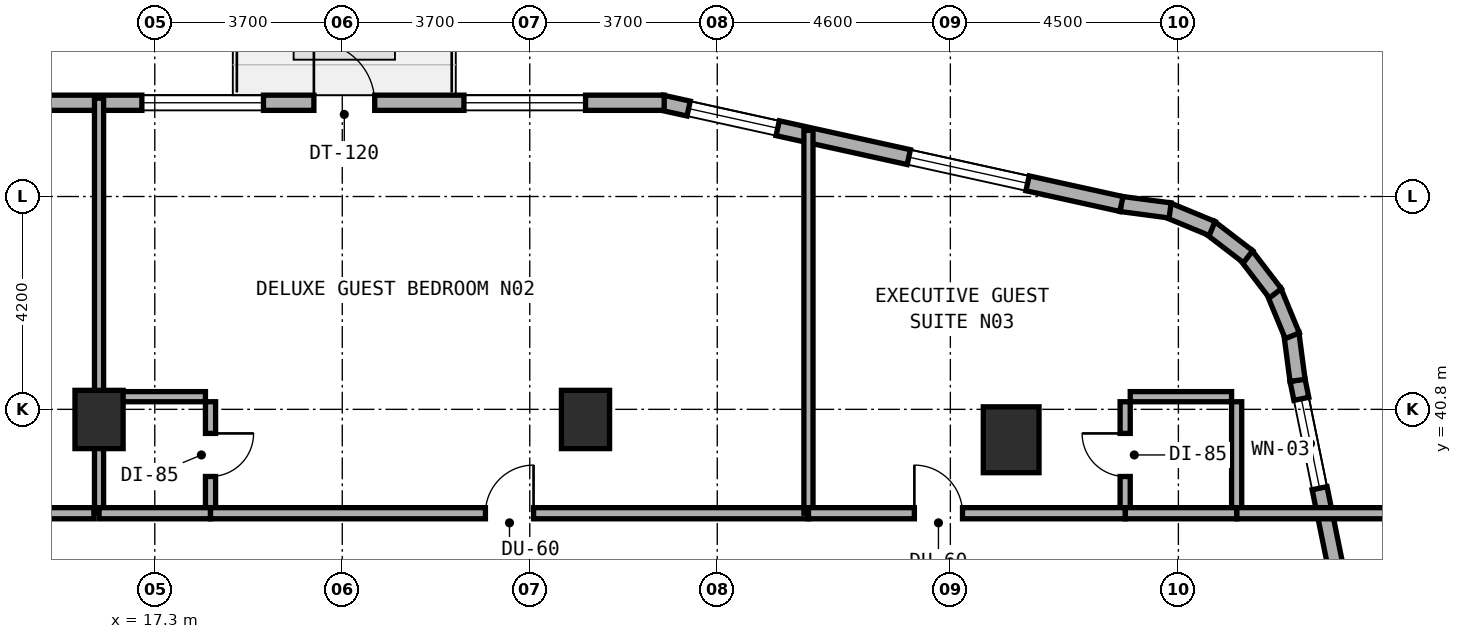
"""IFC4 building model, lengths in metres.
Left out: names, types, materials, properties, quantities, classifications, styles, units other than length and angle.
Written with IfcOpenShell. Run it as: python <this file> out.ifc"""

import sys

from ifc_helpers import new_model, si_unit, direction, frame, frame_2d, origin, origin_2d, place, context, subcontext, project, spatial, rectangle, extrude, element, fill, save


model = new_model("IFC4")
c1 = context("Model", 3, precision=1e-05, world=origin(), true_north=direction((0.0, 1.0)))
c2 = subcontext(c1, "Body", "Model", "MODEL_VIEW")
j1 = project(units=[si_unit("LENGTHUNIT", "METRE"), si_unit("PLANEANGLEUNIT", "RADIAN")], contexts=[c1])
p1 = place(None, origin())
s1 = spatial("IfcSite", under=j1, at=p1, CompositionType="ELEMENT")
p2 = place(p1, origin())
s2 = spatial("IfcBuilding", under=s1, at=p2, CompositionType="ELEMENT")
p3 = place(p2, frame((0.0, 0.0, 48.5)))
s3 = spatial("IfcBuildingStorey", under=s2, at=p3, CompositionType="ELEMENT", Elevation=48.5)
for number, where, z_axis, x_axis in (
    (1, (16.2, 40.6, 0.0), (0.0, 0.0, 1.0), (1.0, 0.0, 0.0)),
    (2, (25.8, 40.6, 0.0), (0.0, 0.0, 1.0), (1.0, 0.0, 0.0)),
):
    element("IfcColumn", number, at=place(p3, frame(where, z_axis=z_axis, x_axis=x_axis)), inside=s3, PredefinedType="COLUMN", context=c2, shape_type="SweptSolid", body=[
        extrude(rectangle(XDim=0.95, YDim=1.15, at=origin_2d()), origin(), (0.0, 0.0, 1.0), 3.5),
    ])
p4 = place(p3, frame((34.2, 40.2, 0.0), z_axis=(0.0, 0.0, 1.0), x_axis=(1.0, 0.0, 0.0)))
e3 = element("IfcColumn", 3, at=p4, inside=s3, PredefinedType="COLUMN", context=c2, shape_type="SweptSolid", body=[
    extrude(rectangle(XDim=1.1, YDim=1.3, at=origin_2d()), origin(), (0.0, 0.0, 1.0), 3.5),
])
p5 = place(p3, frame((41.864, 31.516, 0.0), z_axis=(0.0, 0.0, 1.0), x_axis=(-0.199990901713, 0.979797754249, 0.0)))
e4 = element("IfcWall", 4, at=p5, inside=s3, PredefinedType="STANDARD", context=c2, shape_type="SweptSolid", body=[
    extrude(rectangle(XDim=10.065, YDim=0.3, at=frame_2d((5.033, 0.0))), origin(), (0.0, 0.0, 1.0), 3.22),
])
p6 = place(p5, frame((2.429, 0.0, 0.8)))
e5 = element("IfcOpeningElement", 5, at=p6, cuts=e4, PredefinedType="OPENING", context=c2, shape_type="SweptSolid", body=[
    extrude(rectangle(XDim=2.4, YDim=1.6, at=frame_2d((1.2, 0.8))), frame((0.0, 0.16, 0.0), z_axis=(0.0, -1.0, 0.0), x_axis=(1.0, 0.0, 0.0)), (0.0, 0.0, 1.0), 0.32),
])
p7 = place(p5, frame((7.887, 0.0, 0.85)))
e6 = element("IfcOpeningElement", 6, at=p7, cuts=e4, PredefinedType="OPENING", context=c2, shape_type="SweptSolid", body=[
    extrude(rectangle(XDim=1.8, YDim=1.5, at=frame_2d((0.9, 0.75))), frame((0.0, 0.16, 0.0), z_axis=(0.0, -1.0, 0.0), x_axis=(1.0, 0.0, 0.0)), (0.0, 0.0, 1.0), 0.32),
])
p8 = place(p3, frame((39.852, 41.372, 0.0), z_axis=(0.0, 0.0, 1.0), x_axis=(-0.131174864804, 0.991359246108, 0.0)))
e7 = element("IfcWall", 7, at=p8, inside=s3, PredefinedType="STANDARD", context=c2, shape_type="SweptSolid", body=[
    extrude(rectangle(XDim=0.938, YDim=0.3, at=frame_2d((0.469, 0.0))), origin(), (0.0, 0.0, 1.0), 3.22),
])
p9 = place(p3, frame((39.748, 42.252, 0.0), z_axis=(0.0, 0.0, 1.0), x_axis=(-0.382344263057, 0.924019948111, 0.0)))
e8 = element("IfcWall", 8, at=p9, inside=s3, PredefinedType="STANDARD", context=c2, shape_type="SweptSolid", body=[
    extrude(rectangle(XDim=0.955, YDim=0.3, at=frame_2d((0.477, 0.0))), origin(), (0.0, 0.0, 1.0), 3.22),
])
p10 = place(p3, frame((39.414, 43.089, 0.0), z_axis=(0.0, 0.0, 1.0), x_axis=(-0.608474481025, 0.793573440799, 0.0)))
e9 = element("IfcWall", 9, at=p10, inside=s3, PredefinedType="STANDARD", context=c2, shape_type="SweptSolid", body=[
    extrude(rectangle(XDim=0.955, YDim=0.3, at=frame_2d((0.478, 0.0))), origin(), (0.0, 0.0, 1.0), 3.22),
])
p11 = place(p3, frame((38.875, 43.812, 0.0), z_axis=(0.0, 0.0, 1.0), x_axis=(-0.793668068435, 0.608351047625, 0.0)))
e10 = element("IfcWall", 10, at=p11, inside=s3, PredefinedType="STANDARD", context=c2, shape_type="SweptSolid", body=[
    extrude(rectangle(XDim=0.955, YDim=0.3, at=frame_2d((0.478, 0.0))), origin(), (0.0, 0.0, 1.0), 3.22),
])
p12 = place(p3, frame((38.166, 44.369, 0.0), z_axis=(0.0, 0.0, 1.0), x_axis=(-0.924019948111, 0.382344263057, 0.0)))
e11 = element("IfcWall", 11, at=p12, inside=s3, PredefinedType="STANDARD", context=c2, shape_type="SweptSolid", body=[
    extrude(rectangle(XDim=0.955, YDim=0.3, at=frame_2d((0.477, 0.0))), origin(), (0.0, 0.0, 1.0), 3.22),
])
p13 = place(p3, frame((37.337, 44.725, 0.0), z_axis=(0.0, 0.0, 1.0), x_axis=(-0.991454295543, 0.130454512571, 0.0)))
e12 = element("IfcWall", 12, at=p13, inside=s3, PredefinedType="STANDARD", context=c2, shape_type="SweptSolid", body=[
    extrude(rectangle(XDim=0.973, YDim=0.3, at=frame_2d((0.487, 0.0))), origin(), (0.0, 0.0, 1.0), 3.22),
])
p14 = place(p3, frame((36.376, 44.852, 0.0), z_axis=(0.0, 0.0, 1.0), x_axis=(-0.976540764801, 0.215332614068, 0.0)))
e13 = element("IfcWall", 13, at=p14, inside=s3, PredefinedType="STANDARD", context=c2, shape_type="SweptSolid", body=[
    extrude(rectangle(XDim=9.288, YDim=0.3, at=frame_2d((4.644, 0.0))), origin(), (0.0, 0.0, 1.0), 3.22),
])
p15 = place(p14, frame((1.897, 0.0, 0.8)))
e14 = element("IfcOpeningElement", 14, at=p15, cuts=e13, PredefinedType="OPENING", context=c2, shape_type="SweptSolid", body=[
    extrude(rectangle(XDim=2.4, YDim=1.6, at=frame_2d((1.2, 0.8))), frame((0.0, 0.16, 0.0), z_axis=(0.0, -1.0, 0.0), x_axis=(1.0, 0.0, 0.0)), (0.0, 0.0, 1.0), 0.32),
])
p16 = place(p14, frame((6.946, 0.0, 0.85)))
e15 = element("IfcOpeningElement", 15, at=p16, cuts=e13, PredefinedType="OPENING", context=c2, shape_type="SweptSolid", body=[
    extrude(rectangle(XDim=1.8, YDim=1.5, at=frame_2d((0.9, 0.75))), frame((0.0, 0.16, 0.0), z_axis=(0.0, -1.0, 0.0), x_axis=(1.0, 0.0, 0.0)), (0.0, 0.0, 1.0), 0.32),
])
p17 = place(p3, frame((27.353, 46.85, 0.0), z_axis=(0.0, 0.0, 1.0), x_axis=(-1.0, 0.0, 0.0)))
e16 = element("IfcWall", 16, at=p17, inside=s3, PredefinedType="STANDARD", context=c2, shape_type="SweptSolid", body=[
    extrude(rectangle(XDim=12.591, YDim=0.3, at=frame_2d((6.295, 0.0))), origin(), (0.0, 0.0, 1.0), 3.22),
])
p18 = place(p17, frame((5.713, 0.0, 0.0)))
e17 = element("IfcOpeningElement", 17, at=p18, cuts=e16, PredefinedType="OPENING", context=c2, shape_type="SweptSolid", body=[
    extrude(rectangle(XDim=1.2, YDim=2.15, at=frame_2d((0.6, 1.075))), frame((0.0, 0.16, 0.0), z_axis=(0.0, -1.0, 0.0), x_axis=(1.0, 0.0, 0.0)), (0.0, 0.0, 1.0), 0.32),
])
p19 = place(p17, frame((1.552, 0.0, 0.8)))
e18 = element("IfcOpeningElement", 18, at=p19, cuts=e16, PredefinedType="OPENING", context=c2, shape_type="SweptSolid", body=[
    extrude(rectangle(XDim=2.4, YDim=1.6, at=frame_2d((1.2, 0.8))), frame((0.0, 0.16, 0.0), z_axis=(0.0, -1.0, 0.0), x_axis=(1.0, 0.0, 0.0)), (0.0, 0.0, 1.0), 0.32),
])
p20 = place(p17, frame((7.908, 0.0, 0.8)))
e19 = element("IfcOpeningElement", 19, at=p20, cuts=e16, PredefinedType="OPENING", context=c2, shape_type="SweptSolid", body=[
    extrude(rectangle(XDim=2.4, YDim=1.6, at=frame_2d((1.2, 0.8))), frame((0.0, 0.16, 0.0), z_axis=(0.0, -1.0, 0.0), x_axis=(1.0, 0.0, 0.0)), (0.0, 0.0, 1.0), 0.32),
])
p21 = place(p3, frame((7.9, 38.75, 0.0), z_axis=(0.0, 0.0, 1.0), x_axis=(1.0, 0.0, 0.0)))
e20 = element("IfcWall", 20, at=p21, inside=s3, PredefinedType="SOLIDWALL", context=c2, shape_type="SweptSolid", body=[
    extrude(rectangle(XDim=8.2, YDim=0.22, at=frame_2d((4.1, 0.0))), origin(), (0.0, 0.0, 1.0), 2.955),
])
p22 = place(p21, frame((3.252, 0.0, 0.0)))
e21 = element("IfcOpeningElement", 21, at=p22, cuts=e20, PredefinedType="OPENING", context=c2, shape_type="SweptSolid", body=[
    extrude(rectangle(XDim=0.95, YDim=2.1, at=frame_2d((0.475, 1.05))), frame((0.0, 0.12, 0.0), z_axis=(0.0, -1.0, 0.0), x_axis=(1.0, 0.0, 0.0)), (0.0, 0.0, 1.0), 0.24),
])
p23 = place(p3, frame((16.2, 38.75, 0.0), z_axis=(0.0, 0.0, 1.0), x_axis=(0.0, 1.0, 0.0)))
e22 = element("IfcWall", 22, at=p23, inside=s3, PredefinedType="SOLIDWALL", context=c2, shape_type="SweptSolid", body=[
    extrude(rectangle(XDim=8.19, YDim=0.18, at=frame_2d((4.095, 0.0))), origin(), (0.0, 0.0, 1.0), 2.395),
])
p24 = place(p3, frame((18.4, 38.85, 0.0), z_axis=(0.0, 0.0, 1.0), x_axis=(0.0, 1.0, 0.0)))
e23 = element("IfcWall", 23, at=p24, inside=s3, PredefinedType="PLUMBINGWALL", context=c2, shape_type="SweptSolid", body=[
    extrude(rectangle(XDim=2.1, YDim=0.2, at=frame_2d((1.05, 0.0))), origin(), (0.0, 0.0, 1.0), 2.745),
])
p25 = place(p24, frame((0.625, 0.0, 0.0)))
e24 = element("IfcOpeningElement", 24, at=p25, cuts=e23, PredefinedType="OPENING", context=c2, shape_type="SweptSolid", body=[
    extrude(rectangle(XDim=0.85, YDim=2.1, at=frame_2d((0.425, 1.05))), frame((0.0, 0.11, 0.0), z_axis=(0.0, -1.0, 0.0), x_axis=(1.0, 0.0, 0.0)), (0.0, 0.0, 1.0), 0.22),
])
p26 = place(p3, frame((16.3, 41.05, 0.0), z_axis=(0.0, 0.0, 1.0), x_axis=(1.0, 0.0, 0.0)))
e25 = element("IfcWall", 25, at=p26, inside=s3, PredefinedType="PLUMBINGWALL", context=c2, shape_type="SweptSolid", body=[
    extrude(rectangle(XDim=2.0, YDim=0.2, at=frame_2d((1.0, 0.0))), origin(), (0.0, 0.0, 1.0), 3.22),
])
p27 = place(p3, frame((16.2, 38.75, 0.0), z_axis=(0.0, 0.0, 1.0), x_axis=(1.0, 0.0, 0.0)))
e26 = element("IfcWall", 26, at=p27, inside=s3, PredefinedType="SOLIDWALL", context=c2, shape_type="SweptSolid", body=[
    extrude(rectangle(XDim=2.2, YDim=0.22, at=frame_2d((1.1, 0.0))), origin(), (0.0, 0.0, 1.0), 2.395),
])
p28 = place(p3, frame((18.4, 38.75, 0.0), z_axis=(0.0, 0.0, 1.0), x_axis=(1.0, 0.0, 0.0)))
e27 = element("IfcWall", 27, at=p28, inside=s3, PredefinedType="SOLIDWALL", context=c2, shape_type="SweptSolid", body=[
    extrude(rectangle(XDim=11.8, YDim=0.22, at=frame_2d((5.9, 0.0))), origin(), (0.0, 0.0, 1.0), 2.395),
])
p29 = place(p28, frame((5.425, 0.0, 0.0)))
e28 = element("IfcOpeningElement", 28, at=p29, cuts=e27, PredefinedType="OPENING", context=c2, shape_type="SweptSolid", body=[
    extrude(rectangle(XDim=0.95, YDim=2.1, at=frame_2d((0.475, 1.05))), frame((0.0, 0.12, 0.0), z_axis=(0.0, -1.0, 0.0), x_axis=(1.0, 0.0, 0.0)), (0.0, 0.0, 1.0), 0.24),
])
p30 = place(p3, frame((30.2, 38.75, 0.0), z_axis=(0.0, 0.0, 1.0), x_axis=(0.0, 1.0, 0.0)))
e29 = element("IfcWall", 29, at=p30, inside=s3, PredefinedType="SOLIDWALL", context=c2, shape_type="SweptSolid", body=[
    extrude(rectangle(XDim=7.555, YDim=0.18, at=frame_2d((3.777, 0.0))), origin(), (0.0, 0.0, 1.0), 2.745),
])
p31 = place(p3, frame((36.45, 38.85, 0.0), z_axis=(0.0, 0.0, 1.0), x_axis=(0.0, 1.0, 0.0)))
e30 = element("IfcWall", 30, at=p31, inside=s3, PredefinedType="PLUMBINGWALL", context=c2, shape_type="SweptSolid", body=[
    extrude(rectangle(XDim=2.1, YDim=0.2, at=frame_2d((1.05, 0.0))), origin(), (0.0, 0.0, 1.0), 3.22),
])
p32 = place(p31, frame((0.625, 0.0, 0.0)))
e31 = element("IfcOpeningElement", 31, at=p32, cuts=e30, PredefinedType="OPENING", context=c2, shape_type="SweptSolid", body=[
    extrude(rectangle(XDim=0.85, YDim=2.1, at=frame_2d((0.425, 1.05))), frame((0.0, 0.11, 0.0), z_axis=(0.0, -1.0, 0.0), x_axis=(1.0, 0.0, 0.0)), (0.0, 0.0, 1.0), 0.22),
])
p33 = place(p3, frame((36.55, 41.05, 0.0), z_axis=(0.0, 0.0, 1.0), x_axis=(1.0, 0.0, 0.0)))
e32 = element("IfcWall", 32, at=p33, inside=s3, PredefinedType="PLUMBINGWALL", context=c2, shape_type="SweptSolid", body=[
    extrude(rectangle(XDim=2.0, YDim=0.2, at=frame_2d((1.0, 0.0))), origin(), (0.0, 0.0, 1.0), 3.22),
])
p34 = place(p3, frame((38.65, 38.85, 0.0), z_axis=(0.0, 0.0, 1.0), x_axis=(0.0, 1.0, 0.0)))
e33 = element("IfcWall", 33, at=p34, inside=s3, PredefinedType="PLUMBINGWALL", context=c2, shape_type="SweptSolid", body=[
    extrude(rectangle(XDim=2.1, YDim=0.2, at=frame_2d((1.05, 0.0))), origin(), (0.0, 0.0, 1.0), 3.22),
])
p35 = place(p3, frame((38.65, 38.75, 0.0), z_axis=(0.0, 0.0, 1.0), x_axis=(1.0, 0.0, 0.0)))
e34 = element("IfcWall", 34, at=p35, inside=s3, PredefinedType="SOLIDWALL", context=c2, shape_type="SweptSolid", body=[
    extrude(rectangle(XDim=3.19, YDim=0.22, at=frame_2d((1.595, 0.0))), origin(), (0.0, 0.0, 1.0), 3.22),
])
p36 = place(p3, frame((36.45, 38.75, 0.0), z_axis=(0.0, 0.0, 1.0), x_axis=(1.0, 0.0, 0.0)))
e35 = element("IfcWall", 35, at=p36, inside=s3, PredefinedType="SOLIDWALL", context=c2, shape_type="SweptSolid", body=[
    extrude(rectangle(XDim=2.2, YDim=0.22, at=frame_2d((1.1, 0.0))), origin(), (0.0, 0.0, 1.0), 3.22),
])
p37 = place(p3, frame((30.2, 38.75, 0.0), z_axis=(0.0, 0.0, 1.0), x_axis=(1.0, 0.0, 0.0)))
e36 = element("IfcWall", 36, at=p37, inside=s3, PredefinedType="SOLIDWALL", context=c2, shape_type="SweptSolid", body=[
    extrude(rectangle(XDim=6.25, YDim=0.22, at=frame_2d((3.125, 0.0))), origin(), (0.0, 0.0, 1.0), 2.395),
])
p38 = place(p37, frame((2.09, 0.0, 0.0)))
e37 = element("IfcOpeningElement", 37, at=p38, cuts=e36, PredefinedType="OPENING", context=c2, shape_type="SweptSolid", body=[
    extrude(rectangle(XDim=0.95, YDim=2.1, at=frame_2d((0.475, 1.05))), frame((0.0, 0.12, 0.0), z_axis=(0.0, -1.0, 0.0), x_axis=(1.0, 0.0, 0.0)), (0.0, 0.0, 1.0), 0.24),
])
p39 = place(p7, origin())
e38 = element("IfcWindow", 38, at=p39, inside=s3, PartitioningType="SINGLE_PANEL", PredefinedType="WINDOW", context=c2, shape_type="SweptSolid", body=[
    extrude(rectangle(XDim=1.8, YDim=1.5, at=frame_2d((0.9, 0.75))), frame((0.0, 0.03, 0.0), z_axis=(0.0, -1.0, 0.0), x_axis=(1.0, 0.0, 0.0)), (0.0, 0.0, 1.0), 0.06),
])
fill(e6, e38)
p40 = place(p15, origin())
e39 = element("IfcWindow", 39, at=p40, inside=s3, PartitioningType="SINGLE_PANEL", PredefinedType="WINDOW", context=c2, shape_type="SweptSolid", body=[
    extrude(rectangle(XDim=2.4, YDim=1.6, at=frame_2d((1.2, 0.8))), frame((0.0, 0.03, 0.0), z_axis=(0.0, -1.0, 0.0), x_axis=(1.0, 0.0, 0.0)), (0.0, 0.0, 1.0), 0.06),
])
fill(e14, e39)
p41 = place(p16, origin())
e40 = element("IfcWindow", 40, at=p41, inside=s3, PartitioningType="SINGLE_PANEL", PredefinedType="WINDOW", context=c2, shape_type="SweptSolid", body=[
    extrude(rectangle(XDim=1.8, YDim=1.5, at=frame_2d((0.9, 0.75))), frame((0.0, 0.03, 0.0), z_axis=(0.0, -1.0, 0.0), x_axis=(1.0, 0.0, 0.0)), (0.0, 0.0, 1.0), 0.06),
])
fill(e15, e40)
p42 = place(p18, frame((1.2, 0.0, 0.0), z_axis=(0.0, 0.0, 1.0), x_axis=(-1.0, 0.0, 0.0)))
e41 = element("IfcDoor", 41, at=p42, inside=s3, OperationType="SINGLE_SWING_LEFT", PredefinedType="DOOR", context=c2, shape_type="SweptSolid", body=[
    extrude(rectangle(XDim=1.2, YDim=2.15, at=frame_2d((0.6, 1.075))), frame((0.0, 0.025, 0.0), z_axis=(0.0, -1.0, 0.0), x_axis=(1.0, 0.0, 0.0)), (0.0, 0.0, 1.0), 0.05),
])
fill(e17, e41)
p43 = place(p19, origin())
e42 = element("IfcWindow", 42, at=p43, inside=s3, PartitioningType="SINGLE_PANEL", PredefinedType="WINDOW", context=c2, shape_type="SweptSolid", body=[
    extrude(rectangle(XDim=2.4, YDim=1.6, at=frame_2d((1.2, 0.8))), frame((0.0, 0.03, 0.0), z_axis=(0.0, -1.0, 0.0), x_axis=(1.0, 0.0, 0.0)), (0.0, 0.0, 1.0), 0.06),
])
fill(e18, e42)
p44 = place(p20, origin())
e43 = element("IfcWindow", 43, at=p44, inside=s3, PartitioningType="SINGLE_PANEL", PredefinedType="WINDOW", context=c2, shape_type="SweptSolid", body=[
    extrude(rectangle(XDim=2.4, YDim=1.6, at=frame_2d((1.2, 0.8))), frame((0.0, 0.03, 0.0), z_axis=(0.0, -1.0, 0.0), x_axis=(1.0, 0.0, 0.0)), (0.0, 0.0, 1.0), 0.06),
])
fill(e19, e43)
p45 = place(p25, frame((0.85, 0.0, 0.0), z_axis=(0.0, 0.0, 1.0), x_axis=(-1.0, 0.0, 0.0)))
e44 = element("IfcDoor", 44, at=p45, inside=s3, OperationType="SINGLE_SWING_LEFT", PredefinedType="DOOR", context=c2, shape_type="SweptSolid", body=[
    extrude(rectangle(XDim=0.85, YDim=2.1, at=frame_2d((0.425, 1.05))), frame((0.0, 0.025, 0.0), z_axis=(0.0, -1.0, 0.0), x_axis=(1.0, 0.0, 0.0)), (0.0, 0.0, 1.0), 0.05),
])
fill(e24, e44)
p46 = place(p29, origin())
e45 = element("IfcDoor", 45, at=p46, inside=s3, OperationType="SINGLE_SWING_RIGHT", PredefinedType="DOOR", context=c2, shape_type="SweptSolid", body=[
    extrude(rectangle(XDim=0.95, YDim=2.1, at=frame_2d((0.475, 1.05))), frame((0.0, 0.025, 0.0), z_axis=(0.0, -1.0, 0.0), x_axis=(1.0, 0.0, 0.0)), (0.0, 0.0, 1.0), 0.05),
])
fill(e28, e45)
p47 = place(p32, origin())
e46 = element("IfcDoor", 46, at=p47, inside=s3, OperationType="SINGLE_SWING_RIGHT", PredefinedType="DOOR", context=c2, shape_type="SweptSolid", body=[
    extrude(rectangle(XDim=0.85, YDim=2.1, at=frame_2d((0.425, 1.05))), frame((0.0, 0.025, 0.0), z_axis=(0.0, -1.0, 0.0), x_axis=(1.0, 0.0, 0.0)), (0.0, 0.0, 1.0), 0.05),
])
fill(e31, e46)
p48 = place(p38, origin())
e47 = element("IfcDoor", 47, at=p48, inside=s3, OperationType="SINGLE_SWING_LEFT", PredefinedType="DOOR", context=c2, shape_type="SweptSolid", body=[
    extrude(rectangle(XDim=0.95, YDim=2.1, at=frame_2d((0.475, 1.05))), frame((0.0, 0.025, 0.0), z_axis=(0.0, -1.0, 0.0), x_axis=(1.0, 0.0, 0.0)), (0.0, 0.0, 1.0), 0.05),
])
fill(e37, e47)
save(model, sys.argv[1])
